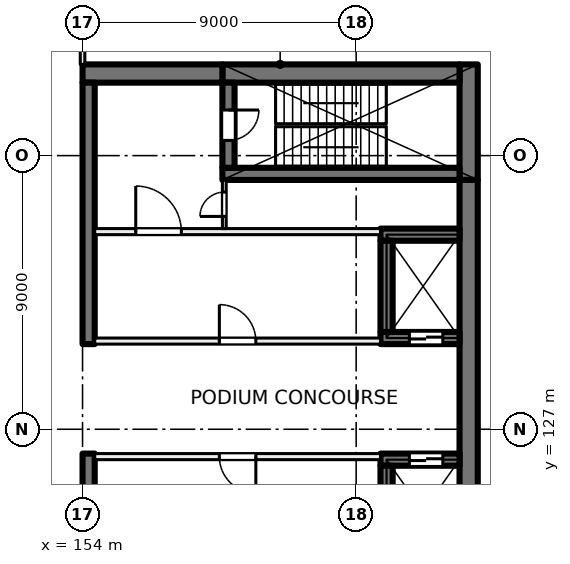
"""IFC4 building model, lengths in metres.
Left out: names, types, materials, properties, quantities, classifications, styles, units other than length and angle.
Written with IfcOpenShell. Run it as: python <this file> out.ifc"""

import sys

from ifc_helpers import new_model, si_unit, direction, frame, frame_2d, origin, place, context, subcontext, project, spatial, rectangle, extrude, element, fill, save


model = new_model("IFC4")
c1 = context("Model", 3, precision=1e-05, world=origin(), true_north=direction((0.0, 1.0)))
c2 = subcontext(c1, "Body", "Model", "MODEL_VIEW")
j1 = project(units=[si_unit("LENGTHUNIT", "METRE"), si_unit("PLANEANGLEUNIT", "RADIAN")], contexts=[c1])
p1 = place(None, origin())
s1 = spatial("IfcSite", under=j1, at=p1, CompositionType="ELEMENT")
p2 = place(p1, origin())
s2 = spatial("IfcBuilding", under=s1, at=p2, CompositionType="ELEMENT")
p3 = place(p2, frame((0.0, 0.0, 12.5)))
s3 = spatial("IfcBuildingStorey", under=s2, at=p3, CompositionType="ELEMENT", Elevation=12.5)
p4 = place(p3, frame((166.7, 139.0, 0.0), z_axis=(0.0, 0.0, 1.0), x_axis=(0.0, -1.0, 0.0)))
e1 = element("IfcWall", 1, at=p4, inside=s3, PredefinedType="SHEAR", context=c2, shape_type="SweptSolid", body=[
    extrude(rectangle(XDim=3.8, YDim=0.6, at=frame_2d((1.9, 0.0))), origin(), (0.0, 0.0, 1.0), 5.0),
])
p5 = place(p3, frame((166.7, 135.2, 0.0), z_axis=(0.0, 0.0, 1.0), x_axis=(0.0, -1.0, 0.0)))
e2 = element("IfcWall", 2, at=p5, inside=s3, PredefinedType="SHEAR", context=c2, shape_type="SweptSolid", body=[
    extrude(rectangle(XDim=14.4, YDim=0.6, at=frame_2d((7.2, 0.0))), origin(), (0.0, 0.0, 1.0), 5.0),
])
p6 = place(p3, frame((166.4, 138.7, 0.0), z_axis=(0.0, 0.0, 1.0), x_axis=(-1.0, 0.0, 0.0)))
e3 = element("IfcWall", 3, at=p6, inside=s3, PredefinedType="SHEAR", context=c2, shape_type="SweptSolid", body=[
    extrude(rectangle(XDim=7.8, YDim=0.6, at=frame_2d((3.9, 0.0))), origin(), (0.0, 0.0, 1.0), 5.0),
])
p7 = place(p3, frame((158.6, 138.7, 0.0), z_axis=(0.0, 0.0, 1.0), x_axis=(-1.0, 0.0, 0.0)))
e4 = element("IfcWall", 4, at=p7, inside=s3, PredefinedType="SHEAR", context=c2, shape_type="SweptSolid", body=[
    extrude(rectangle(XDim=4.6, YDim=0.6, at=frame_2d((2.3, 0.0))), origin(), (0.0, 0.0, 1.0), 5.0),
])
p8 = place(p3, frame((166.4, 135.4, 0.0), z_axis=(0.0, 0.0, 1.0), x_axis=(-1.0, 0.0, 0.0)))
e5 = element("IfcWall", 5, at=p8, inside=s3, PredefinedType="SHEAR", context=c2, shape_type="SweptSolid", body=[
    extrude(rectangle(XDim=7.8, YDim=0.4, at=frame_2d((3.9, 0.0))), origin(), (0.0, 0.0, 1.0), 5.0),
])
p9 = place(p3, frame((158.8, 138.4, 0.0), z_axis=(0.0, 0.0, 1.0), x_axis=(0.0, -1.0, 0.0)))
e6 = element("IfcWall", 6, at=p9, inside=s3, PredefinedType="SHEAR", context=c2, shape_type="SweptSolid", body=[
    extrude(rectangle(XDim=2.8, YDim=0.4, at=frame_2d((1.4, 0.0))), origin(), (0.0, 0.0, 1.0), 5.0),
])
p10 = place(p9, frame((0.9, 0.0, 0.0)))
e7 = element("IfcOpeningElement", 7, at=p10, cuts=e6, PredefinedType="OPENING", context=c2, shape_type="SweptSolid", body=[
    extrude(rectangle(XDim=1.0, YDim=2.1, at=frame_2d((0.5, 1.05))), frame((0.0, 0.21, 0.0), z_axis=(0.0, -1.0, 0.0), x_axis=(1.0, 0.0, 0.0)), (0.0, 0.0, 1.0), 0.42),
])
p11 = place(p3, frame((166.4, 130.0, 0.0), z_axis=(0.0, 0.0, 1.0), x_axis=(-1.0, 0.0, 0.0)))
e8 = element("IfcWall", 8, at=p11, inside=s3, PredefinedType="SHEAR", context=c2, shape_type="SweptSolid", body=[
    extrude(rectangle(XDim=2.6, YDim=0.4, at=frame_2d((1.3, 0.0))), origin(), (0.0, 0.0, 1.0), 5.0),
])
p12 = place(p11, frame((0.55, 0.0, 0.0)))
e9 = element("IfcOpeningElement", 9, at=p12, cuts=e8, PredefinedType="OPENING", context=c2, shape_type="SweptSolid", body=[
    extrude(rectangle(XDim=1.1, YDim=2.1, at=frame_2d((0.55, 1.05))), frame((0.0, 0.21, 0.0), z_axis=(0.0, -1.0, 0.0), x_axis=(1.0, 0.0, 0.0)), (0.0, 0.0, 1.0), 0.42),
])
p13 = place(p3, frame((166.4, 133.4, 0.0), z_axis=(0.0, 0.0, 1.0), x_axis=(-1.0, 0.0, 0.0)))
e10 = element("IfcWall", 10, at=p13, inside=s3, PredefinedType="SHEAR", context=c2, shape_type="SweptSolid", body=[
    extrude(rectangle(XDim=2.6, YDim=0.4, at=frame_2d((1.3, 0.0))), origin(), (0.0, 0.0, 1.0), 5.0),
])
p14 = place(p3, frame((164.0, 133.2, 0.0), z_axis=(0.0, 0.0, 1.0), x_axis=(0.0, -1.0, 0.0)))
e11 = element("IfcWall", 11, at=p14, inside=s3, PredefinedType="SHEAR", context=c2, shape_type="SweptSolid", body=[
    extrude(rectangle(XDim=3.0, YDim=0.4, at=frame_2d((1.5, 0.0))), origin(), (0.0, 0.0, 1.0), 5.0),
])
p15 = place(p3, frame((166.4, 126.0, 0.0), z_axis=(0.0, 0.0, 1.0), x_axis=(-1.0, 0.0, 0.0)))
e12 = element("IfcWall", 12, at=p15, inside=s3, PredefinedType="SHEAR", context=c2, shape_type="SweptSolid", body=[
    extrude(rectangle(XDim=2.6, YDim=0.4, at=frame_2d((1.3, 0.0))), origin(), (0.0, 0.0, 1.0), 5.0),
])
p16 = place(p15, frame((0.55, 0.0, 0.0)))
e13 = element("IfcOpeningElement", 13, at=p16, cuts=e12, PredefinedType="OPENING", context=c2, shape_type="SweptSolid", body=[
    extrude(rectangle(XDim=1.1, YDim=2.1, at=frame_2d((0.55, 1.05))), frame((0.0, 0.21, 0.0), z_axis=(0.0, -1.0, 0.0), x_axis=(1.0, 0.0, 0.0)), (0.0, 0.0, 1.0), 0.42),
])
p17 = place(p3, frame((164.0, 125.8, 0.0), z_axis=(0.0, 0.0, 1.0), x_axis=(0.0, -1.0, 0.0)))
e14 = element("IfcWall", 14, at=p17, inside=s3, PredefinedType="SHEAR", context=c2, shape_type="SweptSolid", body=[
    extrude(rectangle(XDim=3.0, YDim=0.4, at=frame_2d((1.5, 0.0))), origin(), (0.0, 0.0, 1.0), 5.0),
])
for number, where, z_axis, x_axis in (
    (15, (154.2, 138.4, 0.0), (0.0, 0.0, 1.0), (0.0, -1.0, 0.0)),
    (16, (154.2, 126.2, 0.0), (0.0, 0.0, 1.0), (0.0, -1.0, 0.0)),
):
    element("IfcWall", number, at=place(p3, frame(where, z_axis=z_axis, x_axis=x_axis)), inside=s3, PredefinedType="SHEAR", context=c2, shape_type="SweptSolid", body=[
        extrude(rectangle(XDim=8.6, YDim=0.4, at=frame_2d((4.3, 0.0))), origin(), (0.0, 0.0, 1.0), 5.0),
    ])
p18 = place(p3, frame((163.8, 126.1, 0.0), z_axis=(0.0, 0.0, 1.0), x_axis=(-1.0, 0.0, 0.0)))
e17 = element("IfcWall", 17, at=p18, inside=s3, PredefinedType="PARTITIONING", context=c2, shape_type="SweptSolid", body=[
    extrude(rectangle(XDim=9.4, YDim=0.2, at=frame_2d((4.7, 0.0))), origin(), (0.0, 0.0, 1.0), 4.6),
])
p19 = place(p18, frame((4.1, 0.0, 0.0)))
e18 = element("IfcOpeningElement", 18, at=p19, cuts=e17, PredefinedType="OPENING", context=c2, shape_type="SweptSolid", body=[
    extrude(rectangle(XDim=1.2, YDim=2.1, at=frame_2d((0.6, 1.05))), frame((0.0, 0.11, 0.0), z_axis=(0.0, -1.0, 0.0), x_axis=(1.0, 0.0, 0.0)), (0.0, 0.0, 1.0), 0.22),
])
p20 = place(p3, frame((154.4, 129.9, 0.0), z_axis=(0.0, 0.0, 1.0), x_axis=(1.0, 0.0, 0.0)))
e19 = element("IfcWall", 19, at=p20, inside=s3, PredefinedType="PARTITIONING", context=c2, shape_type="SweptSolid", body=[
    extrude(rectangle(XDim=9.4, YDim=0.2, at=frame_2d((4.7, 0.0))), origin(), (0.0, 0.0, 1.0), 4.6),
])
p21 = place(p20, frame((4.1, 0.0, 0.0)))
e20 = element("IfcOpeningElement", 20, at=p21, cuts=e19, PredefinedType="OPENING", context=c2, shape_type="SweptSolid", body=[
    extrude(rectangle(XDim=1.2, YDim=2.1, at=frame_2d((0.6, 1.05))), frame((0.0, 0.11, 0.0), z_axis=(0.0, -1.0, 0.0), x_axis=(1.0, 0.0, 0.0)), (0.0, 0.0, 1.0), 0.22),
])
p22 = place(p3, frame((154.4, 133.5, 0.0), z_axis=(0.0, 0.0, 1.0), x_axis=(1.0, 0.0, 0.0)))
e21 = element("IfcWall", 21, at=p22, inside=s3, PredefinedType="PARTITIONING", context=c2, shape_type="SweptSolid", body=[
    extrude(rectangle(XDim=9.4, YDim=0.2, at=frame_2d((4.7, 0.0))), origin(), (0.0, 0.0, 1.0), 4.6),
])
p23 = place(p22, frame((1.35, 0.0, 0.0)))
e22 = element("IfcOpeningElement", 22, at=p23, cuts=e21, PredefinedType="OPENING", context=c2, shape_type="SweptSolid", body=[
    extrude(rectangle(XDim=1.5, YDim=2.1, at=frame_2d((0.75, 1.05))), frame((0.0, 0.11, 0.0), z_axis=(0.0, -1.0, 0.0), x_axis=(1.0, 0.0, 0.0)), (0.0, 0.0, 1.0), 0.22),
])
p24 = place(p3, frame((158.663, 133.6, 0.0), z_axis=(0.0, 0.0, 1.0), x_axis=(0.0, 1.0, 0.0)))
e23 = element("IfcWall", 23, at=p24, inside=s3, PredefinedType="PARTITIONING", context=c2, shape_type="SweptSolid", body=[
    extrude(rectangle(XDim=1.6, YDim=0.125, at=frame_2d((0.8, 0.0))), origin(), (0.0, 0.0, 1.0), 4.6),
])
p25 = place(p24, frame((0.4, 0.0, 0.0)))
e24 = element("IfcOpeningElement", 24, at=p25, cuts=e23, PredefinedType="OPENING", context=c2, shape_type="SweptSolid", body=[
    extrude(rectangle(XDim=0.8, YDim=2.1, at=frame_2d((0.4, 1.05))), frame((0.0, 0.073, 0.0), z_axis=(0.0, -1.0, 0.0), x_axis=(1.0, 0.0, 0.0)), (0.0, 0.0, 1.0), 0.145),
])
p26 = place(p3, frame((154.0, 153.4, 0.0), z_axis=(0.0, 0.0, 1.0), x_axis=(0.0, -1.0, 0.0)))
e25 = element("IfcWall", 25, at=p26, inside=s3, PredefinedType="PARTITIONING", context=c2, shape_type="SweptSolid", body=[
    extrude(rectangle(XDim=14.4, YDim=0.15, at=frame_2d((7.2, 0.0))), origin(), (0.0, 0.0, 1.0), 4.6),
])
p27 = place(p26, frame((11.0, 0.0, 0.0)))
e26 = element("IfcOpeningElement", 26, at=p27, cuts=e25, PredefinedType="OPENING", context=c2, shape_type="SweptSolid", body=[
    extrude(rectangle(XDim=1.8, YDim=2.1, at=frame_2d((0.9, 1.05))), frame((0.0, 0.085, 0.0), z_axis=(0.0, -1.0, 0.0), x_axis=(1.0, 0.0, 0.0)), (0.0, 0.0, 1.0), 0.17),
])
p28 = place(p16, origin())
e27 = element("IfcDoor", 27, at=p28, inside=s3, OperationType="DOUBLE_DOOR_SLIDING", PredefinedType="DOOR", context=c2, shape_type="SweptSolid", body=[
    extrude(rectangle(XDim=1.1, YDim=2.1, at=frame_2d((0.55, 1.05))), frame((0.0, 0.025, 0.0), z_axis=(0.0, -1.0, 0.0), x_axis=(1.0, 0.0, 0.0)), (0.0, 0.0, 1.0), 0.05),
])
fill(e13, e27)
p29 = place(p12, origin())
e28 = element("IfcDoor", 28, at=p29, inside=s3, OperationType="DOUBLE_DOOR_SLIDING", PredefinedType="DOOR", context=c2, shape_type="SweptSolid", body=[
    extrude(rectangle(XDim=1.1, YDim=2.1, at=frame_2d((0.55, 1.05))), frame((0.0, 0.025, 0.0), z_axis=(0.0, -1.0, 0.0), x_axis=(1.0, 0.0, 0.0)), (0.0, 0.0, 1.0), 0.05),
])
fill(e9, e28)
p30 = place(p19, origin())
e29 = element("IfcDoor", 29, at=p30, inside=s3, OperationType="DOUBLE_DOOR_SINGLE_SWING", PredefinedType="DOOR", context=c2, shape_type="SweptSolid", body=[
    extrude(rectangle(XDim=1.2, YDim=2.1, at=frame_2d((0.6, 1.05))), frame((0.0, 0.025, 0.0), z_axis=(0.0, -1.0, 0.0), x_axis=(1.0, 0.0, 0.0)), (0.0, 0.0, 1.0), 0.05),
])
fill(e18, e29)
p31 = place(p21, origin())
e30 = element("IfcDoor", 30, at=p31, inside=s3, OperationType="DOUBLE_DOOR_SINGLE_SWING", PredefinedType="DOOR", context=c2, shape_type="SweptSolid", body=[
    extrude(rectangle(XDim=1.2, YDim=2.1, at=frame_2d((0.6, 1.05))), frame((0.0, 0.025, 0.0), z_axis=(0.0, -1.0, 0.0), x_axis=(1.0, 0.0, 0.0)), (0.0, 0.0, 1.0), 0.05),
])
fill(e20, e30)
p32 = place(p23, origin())
e31 = element("IfcDoor", 31, at=p32, inside=s3, OperationType="DOUBLE_DOOR_SINGLE_SWING", PredefinedType="DOOR", context=c2, shape_type="SweptSolid", body=[
    extrude(rectangle(XDim=1.5, YDim=2.1, at=frame_2d((0.75, 1.05))), frame((0.0, 0.025, 0.0), z_axis=(0.0, -1.0, 0.0), x_axis=(1.0, 0.0, 0.0)), (0.0, 0.0, 1.0), 0.05),
])
fill(e22, e31)
p33 = place(p10, origin())
e32 = element("IfcDoor", 32, at=p33, inside=s3, OperationType="SINGLE_SWING_RIGHT", PredefinedType="DOOR", context=c2, shape_type="SweptSolid", body=[
    extrude(rectangle(XDim=1.0, YDim=2.1, at=frame_2d((0.5, 1.05))), frame((0.0, 0.025, 0.0), z_axis=(0.0, -1.0, 0.0), x_axis=(1.0, 0.0, 0.0)), (0.0, 0.0, 1.0), 0.05),
])
fill(e7, e32)
p34 = place(p25, origin())
e33 = element("IfcDoor", 33, at=p34, inside=s3, OperationType="SINGLE_SWING_LEFT", PredefinedType="DOOR", context=c2, shape_type="SweptSolid", body=[
    extrude(rectangle(XDim=0.8, YDim=2.1, at=frame_2d((0.4, 1.05))), frame((0.0, 0.025, 0.0), z_axis=(0.0, -1.0, 0.0), x_axis=(1.0, 0.0, 0.0)), (0.0, 0.0, 1.0), 0.05),
])
fill(e24, e33)
save(model, sys.argv[1])
